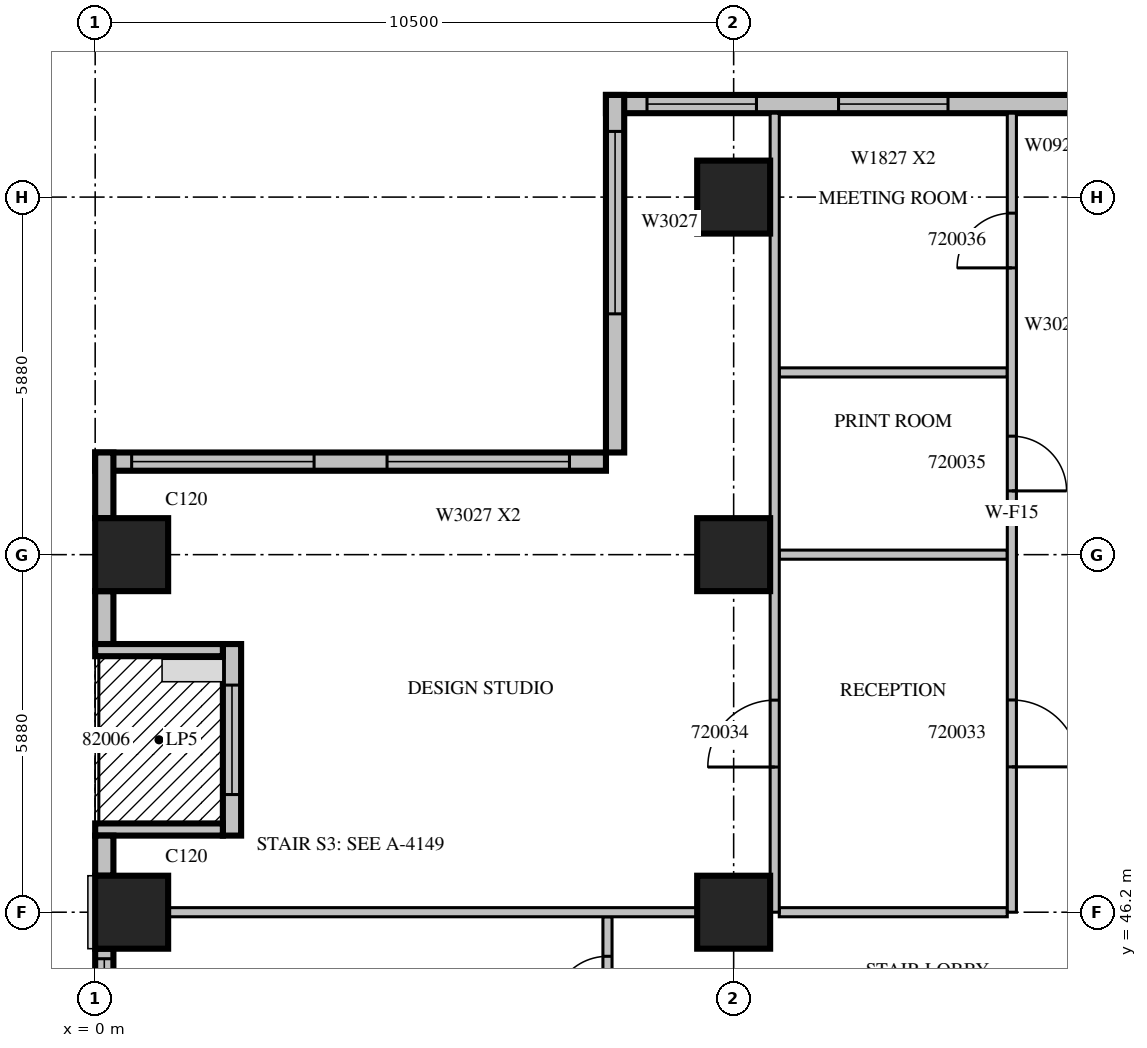
"""IFC4 building model, lengths in metres.
Left out: names, types, materials, properties, quantities, classifications, styles, units other than length and angle.
Written with IfcOpenShell. Run it as: python <this file> out.ifc"""

import sys

from ifc_helpers import new_model, si_unit, direction, frame, frame_2d, origin, origin_2d, place, context, subcontext, project, spatial, rectangle, extrude, source, transform, mapped, element, fill, save


model = new_model("IFC4")
c1 = context("Model", 3, precision=1e-05, world=origin(), true_north=direction((0.0, 1.0)))
c2 = subcontext(c1, "Body", "Model", "MODEL_VIEW")
j1 = project(units=[si_unit("LENGTHUNIT", "METRE"), si_unit("PLANEANGLEUNIT", "RADIAN")], contexts=[c1])
p1 = place(None, origin())
s1 = spatial("IfcSite", under=j1, at=p1, CompositionType="ELEMENT")
p2 = place(p1, origin())
s2 = spatial("IfcBuilding", under=s1, at=p2, CompositionType="ELEMENT")
p3 = place(p2, frame((0.0, 0.0, 95.1)))
s3 = spatial("IfcBuildingStorey", under=s2, at=p3, CompositionType="ELEMENT", Elevation=95.1)
m1 = source(origin(), c2, "Body", "SweptSolid", [
    extrude(rectangle(XDim=1.2, YDim=1.2, at=origin_2d()), origin(), (0.0, 0.0, 1.0), 4.2),
])
for number, where, z_axis, x_axis in (
    (1, (0.6, 46.2, 0.0), (0.0, 0.0, 1.0), (1.0, 0.0, 0.0)),
    (2, (10.5, 46.2, 0.0), (0.0, 0.0, 1.0), (1.0, 0.0, 0.0)),
    (3, (0.6, 52.08, 0.0), (0.0, 0.0, 1.0), (1.0, 0.0, 0.0)),
    (4, (10.5, 52.08, 0.0), (0.0, 0.0, 1.0), (1.0, 0.0, 0.0)),
    (5, (10.5, 57.96, 0.0), (0.0, 0.0, 1.0), (1.0, 0.0, 0.0)),
):
    element("IfcColumn", number, at=place(p3, frame(where, z_axis=z_axis, x_axis=x_axis)), inside=s3, PredefinedType="COLUMN", context=c2, shape_type="MappedRepresentation", body=[
        mapped(m1, transform((0.0, 0.0, 0.0), scale=1.0)),
    ])
m2 = source(origin(), c2, "Body", "SweptSolid", [
    extrude(rectangle(XDim=8.4, YDim=0.3, at=frame_2d((4.2, 0.0))), origin(), (0.0, 0.0, 1.0), 3.8),
])
p4 = place(p3, frame((16.8, 59.49, 0.0), z_axis=(0.0, 0.0, 1.0), x_axis=(-1.0, 0.0, 0.0)))
e6 = element("IfcWall", 6, at=p4, inside=s3, PredefinedType="STANDARD", context=c2, shape_type="MappedRepresentation", body=[
    mapped(m2, transform((0.0, 0.0, 0.0), scale=1.0)),
])
m3 = source(origin(), c2, "Body", "SweptSolid", [
    extrude(rectangle(XDim=1.8, YDim=2.7, at=frame_2d((0.9, 1.35))), frame((0.0, 0.16, 0.0), z_axis=(0.0, -1.0, 0.0), x_axis=(1.0, 0.0, 0.0)), (0.0, 0.0, 1.0), 0.32),
])
p5 = place(p4, frame((2.775, 0.0, 0.6)))
e7 = element("IfcOpeningElement", 7, at=p5, cuts=e6, PredefinedType="OPENING", context=c2, shape_type="MappedRepresentation", body=[
    mapped(m3, transform((0.0, 0.0, 0.0), scale=1.0)),
])
p6 = place(p4, frame((5.925, 0.0, 0.6)))
e8 = element("IfcOpeningElement", 8, at=p6, cuts=e6, PredefinedType="OPENING", context=c2, shape_type="MappedRepresentation", body=[
    mapped(m3, transform((0.0, 0.0, 0.0), scale=1.0)),
])
m4 = source(origin(), c2, "Body", "SweptSolid", [
    extrude(rectangle(XDim=5.88, YDim=0.3, at=frame_2d((2.94, 0.0))), origin(), (0.0, 0.0, 1.0), 3.8),
])
p7 = place(p3, frame((8.55, 59.64, 0.0), z_axis=(0.0, 0.0, 1.0), x_axis=(0.0, -1.0, 0.0)))
e9 = element("IfcWall", 9, at=p7, inside=s3, PredefinedType="STANDARD", context=c2, shape_type="MappedRepresentation", body=[
    mapped(m4, transform((0.0, 0.0, 0.0), scale=1.0)),
])
m5 = source(origin(), c2, "Body", "SweptSolid", [
    extrude(rectangle(XDim=3.0, YDim=2.7, at=frame_2d((1.5, 1.35))), frame((0.0, 0.16, 0.0), z_axis=(0.0, -1.0, 0.0), x_axis=(1.0, 0.0, 0.0)), (0.0, 0.0, 1.0), 0.32),
])
p8 = place(p7, frame((0.6, 0.0, 0.6)))
e10 = element("IfcOpeningElement", 10, at=p8, cuts=e9, PredefinedType="OPENING", context=c2, shape_type="MappedRepresentation", body=[
    mapped(m5, transform((0.0, 0.0, 0.0), scale=1.0)),
])
p9 = place(p3, frame((8.4, 53.61, 0.0), z_axis=(0.0, 0.0, 1.0), x_axis=(-1.0, 0.0, 0.0)))
e11 = element("IfcWall", 11, at=p9, inside=s3, PredefinedType="STANDARD", context=c2, shape_type="MappedRepresentation", body=[
    mapped(m2, transform((0.0, 0.0, 0.0), scale=1.0)),
])
p10 = place(p9, frame((0.6, 0.0, 0.6)))
e12 = element("IfcOpeningElement", 12, at=p10, cuts=e11, PredefinedType="OPENING", context=c2, shape_type="MappedRepresentation", body=[
    mapped(m5, transform((0.0, 0.0, 0.0), scale=1.0)),
])
p11 = place(p9, frame((4.8, 0.0, 0.6)))
e13 = element("IfcOpeningElement", 13, at=p11, cuts=e11, PredefinedType="OPENING", context=c2, shape_type="MappedRepresentation", body=[
    mapped(m5, transform((0.0, 0.0, 0.0), scale=1.0)),
])
m6 = source(origin(), c2, "Body", "SweptSolid", [
    extrude(rectangle(XDim=1.08, YDim=0.3, at=frame_2d((0.54, 0.0))), origin(), (0.0, 0.0, 1.0), 3.8),
])
p12 = place(p3, frame((0.15, 53.76, 0.0), z_axis=(0.0, 0.0, 1.0), x_axis=(0.0, -1.0, 0.0)))
e14 = element("IfcWall", 14, at=p12, inside=s3, PredefinedType="STANDARD", context=c2, shape_type="MappedRepresentation", body=[
    mapped(m6, transform((0.0, 0.0, 0.0), scale=1.0)),
])
p13 = place(p3, frame((0.15, 51.48, 0.0), z_axis=(0.0, 0.0, 1.0), x_axis=(0.0, -1.0, 0.0)))
e15 = element("IfcWall", 15, at=p13, inside=s3, PredefinedType="STANDARD", context=c2, shape_type="SweptSolid", body=[
    extrude(rectangle(XDim=0.87, YDim=0.3, at=frame_2d((0.435, 0.0))), origin(), (0.0, 0.0, 1.0), 3.8),
])
m7 = source(origin(), c2, "Body", "SweptSolid", [
    extrude(rectangle(XDim=3.15, YDim=0.3, at=frame_2d((1.575, 0.0))), origin(), (0.0, 0.0, 1.0), 3.8),
])
p14 = place(p3, frame((2.25, 50.61, 0.0), z_axis=(0.0, 0.0, 1.0), x_axis=(0.0, -1.0, 0.0)))
e16 = element("IfcWall", 16, at=p14, inside=s3, PredefinedType="STANDARD", context=c2, shape_type="MappedRepresentation", body=[
    mapped(m7, transform((0.0, 0.0, 0.0), scale=1.0)),
])
m8 = source(origin(), c2, "Body", "SweptSolid", [
    extrude(rectangle(XDim=1.8, YDim=2.4, at=frame_2d((0.9, 1.2))), frame((0.0, 0.16, 0.0), z_axis=(0.0, -1.0, 0.0), x_axis=(1.0, 0.0, 0.0)), (0.0, 0.0, 1.0), 0.32),
])
p15 = place(p14, frame((0.675, 0.0, 0.0)))
e17 = element("IfcOpeningElement", 17, at=p15, cuts=e16, PredefinedType="OPENING", context=c2, shape_type="MappedRepresentation", body=[
    mapped(m8, transform((0.0, 0.0, 0.0), scale=1.0)),
])
m9 = source(origin(), c2, "Body", "SweptSolid", [
    extrude(rectangle(XDim=2.1, YDim=0.2, at=frame_2d((1.05, 0.0))), origin(), (0.0, 0.0, 1.0), 3.8),
])
for number, where, z_axis, x_axis in (
    (18, (0.0, 50.51, 0.0), (0.0, 0.0, 1.0), (1.0, 0.0, 0.0)),
    (19, (0.0, 47.56, 0.0), (0.0, 0.0, 1.0), (1.0, 0.0, 0.0)),
):
    element("IfcWall", number, at=place(p3, frame(where, z_axis=z_axis, x_axis=x_axis)), inside=s3, PredefinedType="STANDARD", context=c2, shape_type="MappedRepresentation", body=[
        mapped(m9, transform((0.0, 0.0, 0.0), scale=1.0)),
    ])
m10 = source(origin(), c2, "Body", "SweptSolid", [
    extrude(rectangle(XDim=0.66, YDim=0.3, at=frame_2d((0.33, 0.0))), origin(), (0.0, 0.0, 1.0), 3.8),
])
p16 = place(p3, frame((0.15, 47.46, 0.0), z_axis=(0.0, 0.0, 1.0), x_axis=(0.0, -1.0, 0.0)))
e20 = element("IfcWall", 20, at=p16, inside=s3, PredefinedType="STANDARD", context=c2, shape_type="MappedRepresentation", body=[
    mapped(m10, transform((0.0, 0.0, 0.0), scale=1.0)),
])
m11 = source(origin(), c2, "Body", "SweptSolid", [
    extrude(rectangle(XDim=1.6, YDim=0.3, at=frame_2d((0.8, 0.0))), origin(), (0.0, 0.0, 1.0), 3.8),
])
p17 = place(p3, frame((0.15, 45.6, 0.0), z_axis=(0.0, 0.0, 1.0), x_axis=(0.0, -1.0, 0.0)))
e21 = element("IfcWall", 21, at=p17, inside=s3, PredefinedType="STANDARD", context=c2, shape_type="MappedRepresentation", body=[
    mapped(m11, transform((0.0, 0.0, 0.0), scale=1.0)),
])
m12 = source(origin(), c2, "Body", "SweptSolid", [
    extrude(rectangle(XDim=1.2, YDim=2.7, at=frame_2d((0.6, 1.35))), frame((0.0, 0.16, 0.0), z_axis=(0.0, -1.0, 0.0), x_axis=(1.0, 0.0, 0.0)), (0.0, 0.0, 1.0), 0.32),
])
p18 = place(p17, frame((0.165, 0.0, 0.6)))
e22 = element("IfcOpeningElement", 22, at=p18, cuts=e21, PredefinedType="OPENING", context=c2, shape_type="MappedRepresentation", body=[
    mapped(m12, transform((0.0, 0.0, 0.0), scale=1.0)),
])
m13 = source(origin(), c2, "Body", "SweptSolid", [
    extrude(rectangle(XDim=2.2, YDim=0.15, at=frame_2d((1.1, 0.0))), origin(), (0.0, 0.0, 1.0), 3.8),
])
p19 = place(p3, frame((8.425, 43.925, 0.0), z_axis=(0.0, 0.0, 1.0), x_axis=(0.0, 1.0, 0.0)))
e23 = element("IfcWall", 23, at=p19, inside=s3, PredefinedType="PARTITIONING", context=c2, shape_type="MappedRepresentation", body=[
    mapped(m13, transform((0.0, 0.0, 0.0), scale=1.0)),
])
m14 = source(origin(), c2, "Body", "SweptSolid", [
    extrude(rectangle(XDim=0.9, YDim=2.1, at=frame_2d((0.45, 1.05))), frame((0.0, 0.085, 0.0), z_axis=(0.0, -1.0, 0.0), x_axis=(1.0, 0.0, 0.0)), (0.0, 0.0, 1.0), 0.17),
])
p20 = place(p19, frame((0.65, 0.0, 0.0)))
e24 = element("IfcOpeningElement", 24, at=p20, cuts=e23, PredefinedType="OPENING", context=c2, shape_type="MappedRepresentation", body=[
    mapped(m14, transform((0.0, 0.0, 0.0), scale=1.0)),
])
m15 = source(origin(), c2, "Body", "SweptSolid", [
    extrude(rectangle(XDim=3.75, YDim=0.15, at=frame_2d((1.875, 0.0))), origin(), (0.0, 0.0, 1.0), 3.8),
])
for number, where, z_axis, x_axis in (
    (25, (15.0, 52.08, 0.0), (0.0, 0.0, 1.0), (-1.0, 0.0, 0.0)),
    (26, (15.0, 55.077, 0.0), (0.0, 0.0, 1.0), (-1.0, 0.0, 0.0)),
):
    element("IfcWall", number, at=place(p3, frame(where, z_axis=z_axis, x_axis=x_axis)), inside=s3, PredefinedType="PARTITIONING", context=c2, shape_type="MappedRepresentation", body=[
        mapped(m15, transform((0.0, 0.0, 0.0), scale=1.0)),
    ])
m16 = source(origin(), c2, "Body", "SweptSolid", [
    extrude(rectangle(XDim=8.702, YDim=0.15, at=frame_2d((4.351, 0.0))), origin(), (0.0, 0.0, 1.0), 3.8),
])
p21 = place(p3, frame((9.901, 46.2, 0.0), z_axis=(0.0, 0.0, 1.0), x_axis=(-1.0, 0.0, 0.0)))
e27 = element("IfcWall", 27, at=p21, inside=s3, PredefinedType="PARTITIONING", context=c2, shape_type="MappedRepresentation", body=[
    mapped(m16, transform((0.0, 0.0, 0.0), scale=1.0)),
])
p22 = place(p3, frame((15.0, 46.2, 0.0), z_axis=(0.0, 0.0, 1.0), x_axis=(-1.0, 0.0, 0.0)))
e28 = element("IfcWall", 28, at=p22, inside=s3, PredefinedType="PARTITIONING", context=c2, shape_type="MappedRepresentation", body=[
    mapped(m15, transform((0.0, 0.0, 0.0), scale=1.0)),
])
m17 = source(origin(), c2, "Body", "SweptSolid", [
    extrude(rectangle(XDim=13.14, YDim=0.15, at=frame_2d((6.57, 0.0))), origin(), (0.0, 0.0, 1.0), 3.8),
])
p23 = place(p3, frame((11.175, 46.2, 0.0), z_axis=(0.0, 0.0, 1.0), x_axis=(0.0, 1.0, 0.0)))
e29 = element("IfcWall", 29, at=p23, inside=s3, PredefinedType="PARTITIONING", context=c2, shape_type="MappedRepresentation", body=[
    mapped(m17, transform((0.0, 0.0, 0.0), scale=1.0)),
])
m18 = source(origin(), c2, "Body", "SweptSolid", [
    extrude(rectangle(XDim=1.1, YDim=2.1, at=frame_2d((0.55, 1.05))), frame((0.0, 0.085, 0.0), z_axis=(0.0, -1.0, 0.0), x_axis=(1.0, 0.0, 0.0)), (0.0, 0.0, 1.0), 0.17),
])
p24 = place(p23, frame((2.388, 0.0, 0.0)))
e30 = element("IfcOpeningElement", 30, at=p24, cuts=e29, PredefinedType="OPENING", context=c2, shape_type="MappedRepresentation", body=[
    mapped(m18, transform((0.0, 0.0, 0.0), scale=1.0)),
])
p25 = place(p3, frame((15.075, 46.2, 0.0), z_axis=(0.0, 0.0, 1.0), x_axis=(0.0, 1.0, 0.0)))
e31 = element("IfcWall", 31, at=p25, inside=s3, PredefinedType="PARTITIONING", context=c2, shape_type="MappedRepresentation", body=[
    mapped(m17, transform((0.0, 0.0, 0.0), scale=1.0)),
])
p26 = place(p25, frame((2.39, 0.0, 0.0)))
e32 = element("IfcOpeningElement", 32, at=p26, cuts=e31, PredefinedType="OPENING", context=c2, shape_type="MappedRepresentation", body=[
    mapped(m18, transform((0.0, 0.0, 0.0), scale=1.0)),
])
p27 = place(p25, frame((6.928, 0.0, 0.0)))
e33 = element("IfcOpeningElement", 33, at=p27, cuts=e31, PredefinedType="OPENING", context=c2, shape_type="MappedRepresentation", body=[
    mapped(m14, transform((0.0, 0.0, 0.0), scale=1.0)),
])
p28 = place(p25, frame((10.596, 0.0, 0.0)))
e34 = element("IfcOpeningElement", 34, at=p28, cuts=e31, PredefinedType="OPENING", context=c2, shape_type="MappedRepresentation", body=[
    mapped(m14, transform((0.0, 0.0, 0.0), scale=1.0)),
])
m19 = source(origin(), c2, "Body", "SweptSolid", [
    extrude(rectangle(XDim=1.8, YDim=2.7, at=frame_2d((0.9, 1.35))), frame((0.0, 0.03, 0.0), z_axis=(0.0, -1.0, 0.0), x_axis=(1.0, 0.0, 0.0)), (0.0, 0.0, 1.0), 0.06),
])
p29 = place(p5, origin())
e35 = element("IfcWindow", 35, at=p29, inside=s3, PartitioningType="SINGLE_PANEL", PredefinedType="WINDOW", context=c2, shape_type="MappedRepresentation", body=[
    mapped(m19, transform((0.0, 0.0, 0.0), scale=1.0)),
])
fill(e7, e35)
p30 = place(p6, origin())
e36 = element("IfcWindow", 36, at=p30, inside=s3, PartitioningType="SINGLE_PANEL", PredefinedType="WINDOW", context=c2, shape_type="MappedRepresentation", body=[
    mapped(m19, transform((0.0, 0.0, 0.0), scale=1.0)),
])
fill(e8, e36)
m20 = source(origin(), c2, "Body", "SweptSolid", [
    extrude(rectangle(XDim=3.0, YDim=2.7, at=frame_2d((1.5, 1.35))), frame((0.0, 0.03, 0.0), z_axis=(0.0, -1.0, 0.0), x_axis=(1.0, 0.0, 0.0)), (0.0, 0.0, 1.0), 0.06),
])
p31 = place(p8, origin())
e37 = element("IfcWindow", 37, at=p31, inside=s3, PartitioningType="SINGLE_PANEL", PredefinedType="WINDOW", context=c2, shape_type="MappedRepresentation", body=[
    mapped(m20, transform((0.0, 0.0, 0.0), scale=1.0)),
])
fill(e10, e37)
p32 = place(p10, origin())
e38 = element("IfcWindow", 38, at=p32, inside=s3, PartitioningType="SINGLE_PANEL", PredefinedType="WINDOW", context=c2, shape_type="MappedRepresentation", body=[
    mapped(m20, transform((0.0, 0.0, 0.0), scale=1.0)),
])
fill(e12, e38)
p33 = place(p11, origin())
e39 = element("IfcWindow", 39, at=p33, inside=s3, PartitioningType="SINGLE_PANEL", PredefinedType="WINDOW", context=c2, shape_type="MappedRepresentation", body=[
    mapped(m20, transform((0.0, 0.0, 0.0), scale=1.0)),
])
fill(e13, e39)
m21 = source(origin(), c2, "Body", "SweptSolid", [
    extrude(rectangle(XDim=1.8, YDim=2.4, at=frame_2d((0.9, 1.2))), frame((0.0, 0.025, 0.0), z_axis=(0.0, -1.0, 0.0), x_axis=(1.0, 0.0, 0.0)), (0.0, 0.0, 1.0), 0.05),
])
p34 = place(p15, origin())
e40 = element("IfcDoor", 40, at=p34, inside=s3, OperationType="SLIDING_TO_LEFT", PredefinedType="DOOR", context=c2, shape_type="MappedRepresentation", body=[
    mapped(m21, transform((0.0, 0.0, 0.0), scale=1.0)),
])
fill(e17, e40)
m22 = source(origin(), c2, "Body", "SweptSolid", [
    extrude(rectangle(XDim=1.2, YDim=2.7, at=frame_2d((0.6, 1.35))), frame((0.0, 0.03, 0.0), z_axis=(0.0, -1.0, 0.0), x_axis=(1.0, 0.0, 0.0)), (0.0, 0.0, 1.0), 0.06),
])
p35 = place(p18, origin())
e41 = element("IfcWindow", 41, at=p35, inside=s3, PartitioningType="SINGLE_PANEL", PredefinedType="WINDOW", context=c2, shape_type="MappedRepresentation", body=[
    mapped(m22, transform((0.0, 0.0, 0.0), scale=1.0)),
])
fill(e22, e41)
m23 = source(origin(), c2, "Body", "SweptSolid", [
    extrude(rectangle(XDim=0.9, YDim=2.1, at=frame_2d((0.45, 1.05))), frame((0.0, 0.025, 0.0), z_axis=(0.0, -1.0, 0.0), x_axis=(1.0, 0.0, 0.0)), (0.0, 0.0, 1.0), 0.05),
])
p36 = place(p20, origin())
e42 = element("IfcDoor", 42, at=p36, inside=s3, OperationType="SINGLE_SWING_LEFT", PredefinedType="DOOR", context=c2, shape_type="MappedRepresentation", body=[
    mapped(m23, transform((0.0, 0.0, 0.0), scale=1.0)),
])
fill(e24, e42)
m24 = source(origin(), c2, "Body", "SweptSolid", [
    extrude(rectangle(XDim=1.1, YDim=2.1, at=frame_2d((0.55, 1.05))), frame((0.0, 0.025, 0.0), z_axis=(0.0, -1.0, 0.0), x_axis=(1.0, 0.0, 0.0)), (0.0, 0.0, 1.0), 0.05),
])
p37 = place(p26, origin())
e43 = element("IfcDoor", 43, at=p37, inside=s3, OperationType="SINGLE_SWING_RIGHT", PredefinedType="DOOR", context=c2, shape_type="MappedRepresentation", body=[
    mapped(m24, transform((0.0, 0.0, 0.0), scale=1.0)),
])
fill(e32, e43)
p38 = place(p24, origin())
e44 = element("IfcDoor", 44, at=p38, inside=s3, OperationType="SINGLE_SWING_LEFT", PredefinedType="DOOR", context=c2, shape_type="MappedRepresentation", body=[
    mapped(m24, transform((0.0, 0.0, 0.0), scale=1.0)),
])
fill(e30, e44)
p39 = place(p27, origin())
e45 = element("IfcDoor", 45, at=p39, inside=s3, OperationType="SINGLE_SWING_RIGHT", PredefinedType="DOOR", context=c2, shape_type="MappedRepresentation", body=[
    mapped(m23, transform((0.0, 0.0, 0.0), scale=1.0)),
])
fill(e33, e45)
p40 = place(p28, origin())
e46 = element("IfcDoor", 46, at=p40, inside=s3, OperationType="SINGLE_SWING_LEFT", PredefinedType="DOOR", context=c2, shape_type="MappedRepresentation", body=[
    mapped(m23, transform((0.0, 0.0, 0.0), scale=1.0)),
])
fill(e34, e46)
save(model, sys.argv[1])
